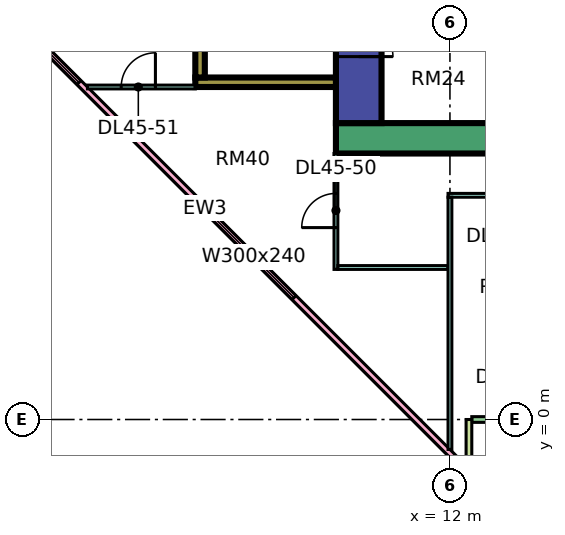
"""IFC4 building model, lengths in metres.
Left out: names, types, materials, properties, quantities, classifications, styles, units other than length and angle.
Written with IfcOpenShell. Run it as: python <this file> out.ifc"""

import sys

from ifc_helpers import new_model, si_unit, direction, frame, frame_2d, origin, place, context, subcontext, project, spatial, rectangle, extrude, element, fill, save


model = new_model("IFC4")
c1 = context("Model", 3, precision=1e-05, world=origin(), true_north=direction((0.0, 1.0)))
c2 = subcontext(c1, "Body", "Model", "MODEL_VIEW")
j1 = project(units=[si_unit("LENGTHUNIT", "METRE"), si_unit("PLANEANGLEUNIT", "RADIAN")], contexts=[c1])
p1 = place(None, origin())
s1 = spatial("IfcSite", under=j1, at=p1, CompositionType="ELEMENT")
p2 = place(p1, origin())
s2 = spatial("IfcBuilding", under=s1, at=p2, CompositionType="ELEMENT")
p3 = place(p2, frame((0.0, 0.0, 194.9)))
s3 = spatial("IfcBuildingStorey", under=s2, at=p3, CompositionType="ELEMENT", Elevation=194.9)
p4 = place(p3, frame((9.0, 7.4, 0.0), z_axis=(0.0, 0.0, 1.0), x_axis=(1.0, 0.0, 0.0)))
e1 = element("IfcWall", 1, at=p4, inside=s3, PredefinedType="SHEAR", context=c2, shape_type="SweptSolid", body=[
    extrude(rectangle(XDim=25.0, YDim=0.8, at=frame_2d((12.5, 0.0))), origin(), (0.0, 0.0, 1.0), 3.75),
])
p5 = place(p3, frame((9.6, 7.8, 0.0), z_axis=(0.0, 0.0, 1.0), x_axis=(0.0, 1.0, 0.0)))
e2 = element("IfcWall", 2, at=p5, inside=s3, PredefinedType="SHEAR", context=c2, shape_type="SweptSolid", body=[
    extrude(rectangle(XDim=11.4, YDim=1.2, at=frame_2d((5.7, 0.0))), origin(), (0.0, 0.0, 1.0), 3.75),
])
p6 = place(p5, frame((4.075, 0.0, 0.0)))
e3 = element("IfcOpeningElement", 3, at=p6, cuts=e2, PredefinedType="OPENING", context=c2, shape_type="SweptSolid", body=[
    extrude(rectangle(XDim=1.1, YDim=2.2, at=frame_2d((0.55, 1.1))), frame((0.0, 0.61, 0.0), z_axis=(0.0, -1.0, 0.0), x_axis=(1.0, 0.0, 0.0)), (0.0, 0.0, 1.0), 1.22),
])
p7 = place(p5, frame((6.575, 0.0, 0.0)))
e4 = element("IfcOpeningElement", 4, at=p7, cuts=e2, PredefinedType="OPENING", context=c2, shape_type="SweptSolid", body=[
    extrude(rectangle(XDim=1.1, YDim=2.2, at=frame_2d((0.55, 1.1))), frame((0.0, 0.61, 0.0), z_axis=(0.0, -1.0, 0.0), x_axis=(1.0, 0.0, 0.0)), (0.0, 0.0, 1.0), 1.22),
])
p8 = place(p5, frame((9.4, 0.0, 0.0)))
e5 = element("IfcOpeningElement", 5, at=p8, cuts=e2, PredefinedType="OPENING", context=c2, shape_type="SweptSolid", body=[
    extrude(rectangle(XDim=1.1, YDim=2.2, at=frame_2d((0.55, 1.1))), frame((0.0, 0.61, 0.0), z_axis=(0.0, -1.0, 0.0), x_axis=(1.0, 0.0, 0.0)), (0.0, 0.0, 1.0), 1.22),
])
p9 = place(p5, frame((1.75, 0.0, 0.0)))
e6 = element("IfcOpeningElement", 6, at=p9, cuts=e2, PredefinedType="OPENING", context=c2, shape_type="SweptSolid", body=[
    extrude(rectangle(XDim=0.9, YDim=2.1, at=frame_2d((0.45, 1.05))), frame((0.0, 0.61, 0.0), z_axis=(0.0, -1.0, 0.0), x_axis=(1.0, 0.0, 0.0)), (0.0, 0.0, 1.0), 1.22),
])
p10 = place(p3, frame((5.3, 8.875, 0.0), z_axis=(0.0, 0.0, 1.0), x_axis=(1.0, 0.0, 0.0)))
e7 = element("IfcWall", 7, at=p10, inside=s3, PredefinedType="SHEAR", context=c2, shape_type="SweptSolid", body=[
    extrude(rectangle(XDim=3.7, YDim=0.25, at=frame_2d((1.85, 0.0))), origin(), (0.0, 0.0, 1.0), 3.75),
])
p11 = place(p3, frame((5.425, 9.0, 0.0), z_axis=(0.0, 0.0, 1.0), x_axis=(0.0, 1.0, 0.0)))
e8 = element("IfcWall", 8, at=p11, inside=s3, PredefinedType="SHEAR", context=c2, shape_type="SweptSolid", body=[
    extrude(rectangle(XDim=4.0, YDim=0.25, at=frame_2d((2.0, 0.0))), origin(), (0.0, 0.0, 1.0), 3.75),
])
p12 = place(p3, frame((-1.447, 12.553, 0.0), z_axis=(0.0, 0.0, 1.0), x_axis=(0.707106781187, -0.707106781187, 0.0)))
e9 = element("IfcWall", 9, at=p12, inside=s3, PredefinedType="SOLIDWALL", context=c2, shape_type="SweptSolid", body=[
    extrude(rectangle(XDim=19.799, YDim=0.15, at=frame_2d((9.899, 0.0))), origin(), (0.0, 0.0, 1.0), 3.35),
])
p13 = place(p12, frame((2.212, 0.0, 0.45)))
e10 = element("IfcOpeningElement", 10, at=p13, cuts=e9, PredefinedType="OPENING", context=c2, shape_type="SweptSolid", body=[
    extrude(rectangle(XDim=3.0, YDim=2.4, at=frame_2d((1.5, 1.2))), frame((0.0, 0.085, 0.0), z_axis=(0.0, -1.0, 0.0), x_axis=(1.0, 0.0, 0.0)), (0.0, 0.0, 1.0), 0.17),
])
p14 = place(p12, frame((10.216, 0.0, 0.45)))
e11 = element("IfcOpeningElement", 11, at=p14, cuts=e9, PredefinedType="OPENING", context=c2, shape_type="SweptSolid", body=[
    extrude(rectangle(XDim=3.0, YDim=2.4, at=frame_2d((1.5, 1.2))), frame((0.0, 0.085, 0.0), z_axis=(0.0, -1.0, 0.0), x_axis=(1.0, 0.0, 0.0)), (0.0, 0.0, 1.0), 0.17),
])
p15 = place(p3, frame((12.575, 0.0, 0.0), z_axis=(0.0, 0.0, 1.0), x_axis=(1.0, 0.0, 0.0)))
e12 = element("IfcWall", 12, at=p15, inside=s3, PredefinedType="SOLIDWALL", context=c2, shape_type="SweptSolid", body=[
    extrude(rectangle(XDim=11.35, YDim=0.15, at=frame_2d((5.675, 0.0))), origin(), (0.0, 0.0, 1.0), 3.35),
])
p16 = place(p15, frame((0.613, 0.0, 0.0)))
e13 = element("IfcOpeningElement", 13, at=p16, cuts=e12, PredefinedType="OPENING", context=c2, shape_type="SweptSolid", body=[
    extrude(rectangle(XDim=1.2, YDim=2.4, at=frame_2d((0.6, 1.2))), frame((0.0, 0.085, 0.0), z_axis=(0.0, -1.0, 0.0), x_axis=(1.0, 0.0, 0.0)), (0.0, 0.0, 1.0), 0.17),
])
p17 = place(p15, frame((5.15, 0.0, 0.45)))
e14 = element("IfcOpeningElement", 14, at=p17, cuts=e12, PredefinedType="OPENING", context=c2, shape_type="SweptSolid", body=[
    extrude(rectangle(XDim=3.0, YDim=2.4, at=frame_2d((1.5, 1.2))), frame((0.0, 0.085, 0.0), z_axis=(0.0, -1.0, 0.0), x_axis=(1.0, 0.0, 0.0)), (0.0, 0.0, 1.0), 0.17),
])
p18 = place(p3, frame((12.5, -1.5, 0.0), z_axis=(0.0, 0.0, 1.0), x_axis=(0.0, 1.0, 0.0)))
e15 = element("IfcWall", 15, at=p18, inside=s3, PredefinedType="SOLIDWALL", context=c2, shape_type="SweptSolid", body=[
    extrude(rectangle(XDim=1.5, YDim=0.15, at=frame_2d((0.75, 0.0))), origin(), (0.0, 0.0, 1.0), 3.35),
])
p19 = place(p3, frame((2.461, 8.75, 0.0), z_axis=(0.0, 0.0, 1.0), x_axis=(1.0, 0.0, 0.0)))
e16 = element("IfcWall", 16, at=p19, inside=s3, PredefinedType="PARTITIONING", context=c2, shape_type="SweptSolid", body=[
    extrude(rectangle(XDim=2.839, YDim=0.1, at=frame_2d((1.419, 0.0))), origin(), (0.0, 0.0, 1.0), 3.35),
])
p20 = place(p19, frame((0.889, 0.0, 0.0)))
e17 = element("IfcOpeningElement", 17, at=p20, cuts=e16, PredefinedType="OPENING", context=c2, shape_type="SweptSolid", body=[
    extrude(rectangle(XDim=0.9, YDim=2.1, at=frame_2d((0.45, 1.05))), frame((0.0, 0.06, 0.0), z_axis=(0.0, -1.0, 0.0), x_axis=(1.0, 0.0, 0.0)), (0.0, 0.0, 1.0), 0.12),
])
p21 = place(p3, frame((9.0, 3.95, 0.0), z_axis=(0.0, 0.0, 1.0), x_axis=(0.0, 1.0, 0.0)))
e18 = element("IfcWall", 18, at=p21, inside=s3, PredefinedType="PARTITIONING", context=c2, shape_type="SweptSolid", body=[
    extrude(rectangle(XDim=3.05, YDim=0.1, at=frame_2d((1.525, 0.0))), origin(), (0.0, 0.0, 1.0), 3.35),
])
p22 = place(p21, frame((1.1, 0.0, 0.0)))
e19 = element("IfcOpeningElement", 19, at=p22, cuts=e18, PredefinedType="OPENING", context=c2, shape_type="SweptSolid", body=[
    extrude(rectangle(XDim=0.9, YDim=2.1, at=frame_2d((0.45, 1.05))), frame((0.0, 0.06, 0.0), z_axis=(0.0, -1.0, 0.0), x_axis=(1.0, 0.0, 0.0)), (0.0, 0.0, 1.0), 0.12),
])
p23 = place(p3, frame((9.05, 4.0, 0.0), z_axis=(0.0, 0.0, 1.0), x_axis=(1.0, 0.0, 0.0)))
e20 = element("IfcWall", 20, at=p23, inside=s3, PredefinedType="PARTITIONING", context=c2, shape_type="SweptSolid", body=[
    extrude(rectangle(XDim=2.9, YDim=0.1, at=frame_2d((1.45, 0.0))), origin(), (0.0, 0.0, 1.0), 3.35),
])
p24 = place(p3, frame((11.95, 5.9, 0.0), z_axis=(0.0, 0.0, 1.0), x_axis=(1.0, 0.0, 0.0)))
e21 = element("IfcWall", 21, at=p24, inside=s3, PredefinedType="PARTITIONING", context=c2, shape_type="SweptSolid", body=[
    extrude(rectangle(XDim=21.1, YDim=0.1, at=frame_2d((10.55, 0.0))), origin(), (0.0, 0.0, 1.0), 3.35),
])
p25 = place(p24, frame((1.1, 0.0, 0.0)))
e22 = element("IfcOpeningElement", 22, at=p25, cuts=e21, PredefinedType="OPENING", context=c2, shape_type="SweptSolid", body=[
    extrude(rectangle(XDim=0.9, YDim=2.1, at=frame_2d((0.45, 1.05))), frame((0.0, 0.06, 0.0), z_axis=(0.0, -1.0, 0.0), x_axis=(1.0, 0.0, 0.0)), (0.0, 0.0, 1.0), 0.12),
])
p26 = place(p24, frame((13.1, 0.0, 0.0)))
e23 = element("IfcOpeningElement", 23, at=p26, cuts=e21, PredefinedType="OPENING", context=c2, shape_type="SweptSolid", body=[
    extrude(rectangle(XDim=0.9, YDim=2.1, at=frame_2d((0.45, 1.05))), frame((0.0, 0.06, 0.0), z_axis=(0.0, -1.0, 0.0), x_axis=(1.0, 0.0, 0.0)), (0.0, 0.0, 1.0), 0.12),
])
p27 = place(p24, frame((16.1, 0.0, 0.0)))
e24 = element("IfcOpeningElement", 24, at=p27, cuts=e21, PredefinedType="OPENING", context=c2, shape_type="SweptSolid", body=[
    extrude(rectangle(XDim=0.9, YDim=2.1, at=frame_2d((0.45, 1.05))), frame((0.0, 0.06, 0.0), z_axis=(0.0, -1.0, 0.0), x_axis=(1.0, 0.0, 0.0)), (0.0, 0.0, 1.0), 0.12),
])
p28 = place(p24, frame((7.1, 0.0, 0.0)))
e25 = element("IfcOpeningElement", 25, at=p28, cuts=e21, PredefinedType="OPENING", context=c2, shape_type="SweptSolid", body=[
    extrude(rectangle(XDim=0.9, YDim=2.1, at=frame_2d((0.45, 1.05))), frame((0.0, 0.06, 0.0), z_axis=(0.0, -1.0, 0.0), x_axis=(1.0, 0.0, 0.0)), (0.0, 0.0, 1.0), 0.12),
])
p29 = place(p3, frame((12.0, -0.788, 0.0), z_axis=(0.0, 0.0, 1.0), x_axis=(0.0, 1.0, 0.0)))
e26 = element("IfcWall", 26, at=p29, inside=s3, PredefinedType="PARTITIONING", context=c2, shape_type="SweptSolid", body=[
    extrude(rectangle(XDim=6.638, YDim=0.1, at=frame_2d((3.319, 0.0))), origin(), (0.0, 0.0, 1.0), 3.35),
])
p30 = place(p13, origin())
e27 = element("IfcWindow", 27, at=p30, inside=s3, PartitioningType="SINGLE_PANEL", PredefinedType="WINDOW", context=c2, shape_type="SweptSolid", body=[
    extrude(rectangle(XDim=3.0, YDim=2.4, at=frame_2d((1.5, 1.2))), frame((0.0, 0.03, 0.0), z_axis=(0.0, -1.0, 0.0), x_axis=(1.0, 0.0, 0.0)), (0.0, 0.0, 1.0), 0.06),
])
fill(e10, e27)
p31 = place(p14, origin())
e28 = element("IfcWindow", 28, at=p31, inside=s3, PartitioningType="SINGLE_PANEL", PredefinedType="WINDOW", context=c2, shape_type="SweptSolid", body=[
    extrude(rectangle(XDim=3.0, YDim=2.4, at=frame_2d((1.5, 1.2))), frame((0.0, 0.03, 0.0), z_axis=(0.0, -1.0, 0.0), x_axis=(1.0, 0.0, 0.0)), (0.0, 0.0, 1.0), 0.06),
])
fill(e11, e28)
p32 = place(p9, frame((0.9, 0.0, 0.0), z_axis=(0.0, 0.0, 1.0), x_axis=(-1.0, 0.0, 0.0)))
e29 = element("IfcDoor", 29, at=p32, inside=s3, OperationType="SINGLE_SWING_LEFT", PredefinedType="DOOR", context=c2, shape_type="SweptSolid", body=[
    extrude(rectangle(XDim=0.9, YDim=2.1, at=frame_2d((0.45, 1.05))), frame((0.0, 0.025, 0.0), z_axis=(0.0, -1.0, 0.0), x_axis=(1.0, 0.0, 0.0)), (0.0, 0.0, 1.0), 0.05),
])
fill(e6, e29)
p33 = place(p22, origin())
e30 = element("IfcDoor", 30, at=p33, inside=s3, OperationType="SINGLE_SWING_LEFT", PredefinedType="DOOR", context=c2, shape_type="SweptSolid", body=[
    extrude(rectangle(XDim=0.9, YDim=2.1, at=frame_2d((0.45, 1.05))), frame((0.0, 0.025, 0.0), z_axis=(0.0, -1.0, 0.0), x_axis=(1.0, 0.0, 0.0)), (0.0, 0.0, 1.0), 0.05),
])
fill(e19, e30)
p34 = place(p20, frame((0.9, 0.0, 0.0), z_axis=(0.0, 0.0, 1.0), x_axis=(-1.0, 0.0, 0.0)))
e31 = element("IfcDoor", 31, at=p34, inside=s3, OperationType="SINGLE_SWING_RIGHT", PredefinedType="DOOR", context=c2, shape_type="SweptSolid", body=[
    extrude(rectangle(XDim=0.9, YDim=2.1, at=frame_2d((0.45, 1.05))), frame((0.0, 0.025, 0.0), z_axis=(0.0, -1.0, 0.0), x_axis=(1.0, 0.0, 0.0)), (0.0, 0.0, 1.0), 0.05),
])
fill(e17, e31)
save(model, sys.argv[1])
